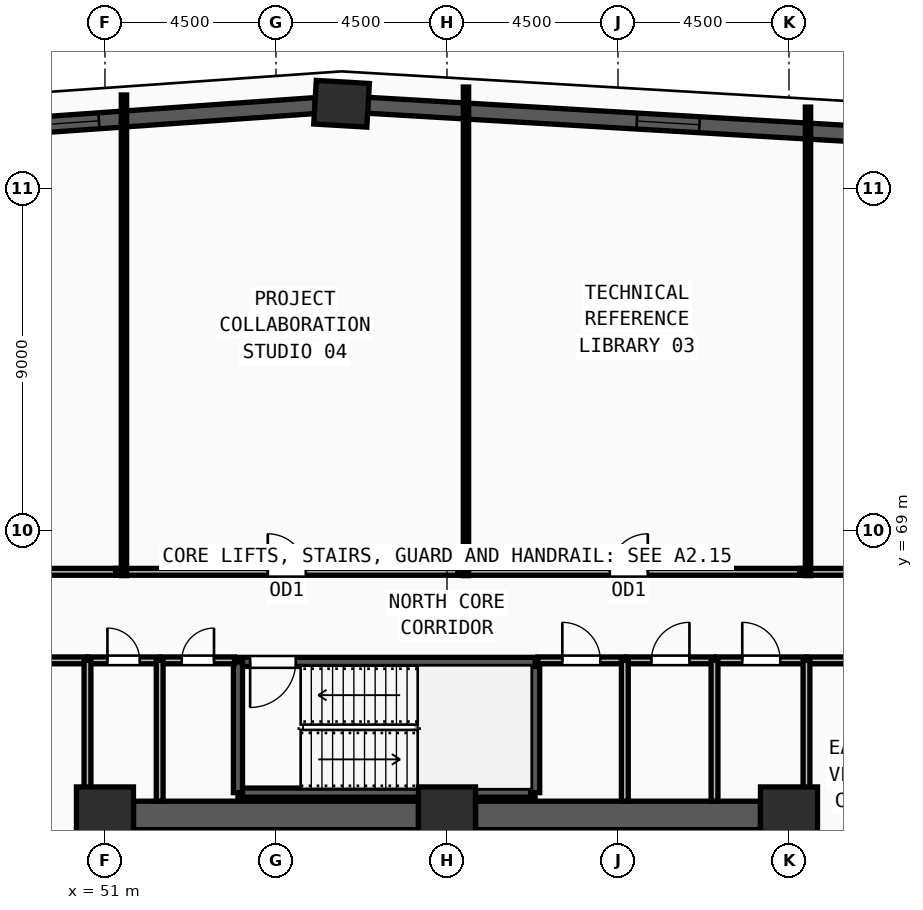
"""IFC4 building model, lengths in metres.
Left out: names, types, materials, properties, quantities, classifications, styles, units other than length and angle.
Written with IfcOpenShell. Run it as: python <this file> out.ifc"""

import sys

from ifc_helpers import new_model, si_unit, direction, frame, frame_2d, origin, origin_2d, place, context, subcontext, project, spatial, rectangle, extrude, source, transform, mapped, element, fill, save


model = new_model("IFC4")
c1 = context("Model", 3, precision=1e-05, world=origin(), true_north=direction((0.0, 1.0)))
c2 = subcontext(c1, "Body", "Model", "MODEL_VIEW")
j1 = project(units=[si_unit("LENGTHUNIT", "METRE"), si_unit("PLANEANGLEUNIT", "RADIAN")], contexts=[c1])
p1 = place(None, origin())
s1 = spatial("IfcSite", under=j1, at=p1, CompositionType="ELEMENT")
p2 = place(p1, origin())
s2 = spatial("IfcBuilding", under=s1, at=p2, CompositionType="ELEMENT")
p3 = place(p2, frame((0.0, 0.0, 124.5)))
s3 = spatial("IfcBuildingStorey", under=s2, at=p3, CompositionType="ELEMENT", Elevation=124.5)
m1 = source(origin(), c2, "Body", "SweptSolid", [
    extrude(rectangle(XDim=1.5, YDim=1.5, at=origin_2d()), origin(), (0.0, 0.0, 1.0), 3.75),
])
for number, where, z_axis, x_axis in (
    (1, (69.0, 61.5, 0.0), (0.0, 0.0, 1.0), (1.0, 0.0, 0.0)),
    (2, (60.0, 61.5, 0.0), (0.0, 0.0, 1.0), (1.0, 0.0, 0.0)),
    (3, (51.0, 61.5, 0.0), (0.0, 0.0, 1.0), (1.0, 0.0, 0.0)),
):
    element("IfcColumn", number, at=place(p3, frame(where, z_axis=z_axis, x_axis=x_axis)), inside=s3, PredefinedType="COLUMN", context=c2, shape_type="MappedRepresentation", body=[
        mapped(m1, transform((0.0, 0.0, 0.0), x_axis=(1.0, 0.0, 0.0), y_axis=(0.0, 1.0, 0.0), z_axis=(0.0, 0.0, 1.0), scale=1.0)),
    ])
m2 = source(origin(), c2, "Body", "SweptSolid", [
    extrude(rectangle(XDim=1.4, YDim=1.15, at=origin_2d()), origin(), (0.0, 0.0, 1.0), 3.75),
])
p4 = place(p3, frame((57.226, 80.226, 0.0), z_axis=(0.0, 0.0, 1.0), x_axis=(-0.99829120239, 0.058435222518, 0.0)))
e4 = element("IfcColumn", 4, at=p4, inside=s3, PredefinedType="COLUMN", context=c2, shape_type="MappedRepresentation", body=[
    mapped(m2, transform((0.0, 0.0, 0.0), x_axis=(1.0, 0.0, 0.0), y_axis=(0.0, 1.0, 0.0), z_axis=(0.0, 0.0, 1.0), scale=1.0)),
])
p5 = place(p3, frame((89.539, 78.332, 0.0), z_axis=(0.0, 0.0, 1.0), x_axis=(-0.998285887644, 0.058525947494, 0.0)))
e5 = element("IfcWall", 5, at=p5, inside=s3, PredefinedType="SOLIDWALL", context=c2, shape_type="SweptSolid", body=[
    extrude(rectangle(XDim=31.678, YDim=0.42, at=frame_2d((15.839, 0.0))), origin(), (0.0, 0.0, 1.0), 3.57),
])
m3 = source(origin(), c2, "Body", "SweptSolid", [
    extrude(rectangle(XDim=1.65, YDim=1.95, at=frame_2d((0.825, 0.975))), frame((0.0, 0.22, 0.0), z_axis=(0.0, -1.0, 0.0), x_axis=(1.0, 0.0, 0.0)), (0.0, 0.0, 1.0), 0.44),
])
p6 = place(p5, frame((7.095, 0.0, 0.55)))
e6 = element("IfcOpeningElement", 6, at=p6, cuts=e5, PredefinedType="OPENING", context=c2, shape_type="MappedRepresentation", body=[
    mapped(m3, transform((0.0, 0.0, 0.0), x_axis=(1.0, 0.0, 0.0), y_axis=(0.0, 1.0, 0.0), z_axis=(0.0, 0.0, 1.0), scale=1.0)),
])
p7 = place(p5, frame((15.014, 0.0, 0.55)))
e7 = element("IfcOpeningElement", 7, at=p7, cuts=e5, PredefinedType="OPENING", context=c2, shape_type="MappedRepresentation", body=[
    mapped(m3, transform((0.0, 0.0, 0.0), x_axis=(1.0, 0.0, 0.0), y_axis=(0.0, 1.0, 0.0), z_axis=(0.0, 0.0, 1.0), scale=1.0)),
])
p8 = place(p5, frame((22.934, 0.0, 0.55)))
e8 = element("IfcOpeningElement", 8, at=p8, cuts=e5, PredefinedType="OPENING", context=c2, shape_type="MappedRepresentation", body=[
    mapped(m3, transform((0.0, 0.0, 0.0), x_axis=(1.0, 0.0, 0.0), y_axis=(0.0, 1.0, 0.0), z_axis=(0.0, 0.0, 1.0), scale=1.0)),
])
p9 = place(p3, frame((56.538, 80.178, 0.0), z_axis=(0.0, 0.0, 1.0), x_axis=(-0.997543510354, -0.070049589226, 0.0)))
e9 = element("IfcWall", 9, at=p9, inside=s3, PredefinedType="SOLIDWALL", context=c2, shape_type="SweptSolid", body=[
    extrude(rectangle(XDim=26.139, YDim=0.42, at=frame_2d((13.07, 0.0))), origin(), (0.0, 0.0, 1.0), 3.57),
])
p10 = place(p9, frame((5.71, 0.0, 0.55)))
e10 = element("IfcOpeningElement", 10, at=p10, cuts=e9, PredefinedType="OPENING", context=c2, shape_type="MappedRepresentation", body=[
    mapped(m3, transform((0.0, 0.0, 0.0), x_axis=(1.0, 0.0, 0.0), y_axis=(0.0, 1.0, 0.0), z_axis=(0.0, 0.0, 1.0), scale=1.0)),
])
p11 = place(p9, frame((12.245, 0.0, 0.55)))
e11 = element("IfcOpeningElement", 11, at=p11, cuts=e9, PredefinedType="OPENING", context=c2, shape_type="MappedRepresentation", body=[
    mapped(m3, transform((0.0, 0.0, 0.0), x_axis=(1.0, 0.0, 0.0), y_axis=(0.0, 1.0, 0.0), z_axis=(0.0, 0.0, 1.0), scale=1.0)),
])
p12 = place(p9, frame((18.779, 0.0, 0.55)))
e12 = element("IfcOpeningElement", 12, at=p12, cuts=e9, PredefinedType="OPENING", context=c2, shape_type="MappedRepresentation", body=[
    mapped(m3, transform((0.0, 0.0, 0.0), x_axis=(1.0, 0.0, 0.0), y_axis=(0.0, 1.0, 0.0), z_axis=(0.0, 0.0, 1.0), scale=1.0)),
])
for number, where, z_axis, x_axis in (
    (13, (51.75, 61.5, 0.0), (0.0, 0.0, 1.0), (1.0, 0.0, 0.0)),
    (14, (60.75, 61.5, 0.0), (0.0, 0.0, 1.0), (1.0, 0.0, 0.0)),
):
    element("IfcWall", number, at=place(p3, frame(where, z_axis=z_axis, x_axis=x_axis)), inside=s3, PredefinedType="SHEAR", context=c2, shape_type="SweptSolid", body=[
        extrude(rectangle(XDim=7.5, YDim=0.75, at=frame_2d((3.75, 0.0))), origin(), (0.0, 0.0, 1.0), 3.57),
    ])
p13 = place(p3, frame((54.5, 62.1, 0.0), z_axis=(0.0, 0.0, 1.0), x_axis=(1.0, 0.0, 0.0)))
e15 = element("IfcWall", 15, at=p13, inside=s3, PredefinedType="SOLIDWALL", context=c2, shape_type="SweptSolid", body=[
    extrude(rectangle(XDim=7.82, YDim=0.24, at=frame_2d((3.91, 0.0))), origin(), (0.0, 0.0, 1.0), 3.57),
])
p14 = place(p3, frame((62.32, 62.1, 0.0), z_axis=(0.0, 0.0, 1.0), x_axis=(0.0, 1.0, 0.0)))
e16 = element("IfcWall", 16, at=p14, inside=s3, PredefinedType="SOLIDWALL", context=c2, shape_type="SweptSolid", body=[
    extrude(rectangle(XDim=3.44, YDim=0.24, at=frame_2d((1.72, 0.0))), origin(), (0.0, 0.0, 1.0), 3.57),
])
p15 = place(p3, frame((62.32, 65.54, 0.0), z_axis=(0.0, 0.0, 1.0), x_axis=(-1.0, 0.0, 0.0)))
e17 = element("IfcWall", 17, at=p15, inside=s3, PredefinedType="SOLIDWALL", context=c2, shape_type="SweptSolid", body=[
    extrude(rectangle(XDim=7.82, YDim=0.24, at=frame_2d((3.91, 0.0))), origin(), (0.0, 0.0, 1.0), 3.57),
])
m4 = source(origin(), c2, "Body", "SweptSolid", [
    extrude(rectangle(XDim=1.2, YDim=2.2, at=frame_2d((0.6, 1.1))), frame((0.0, 0.13, 0.0), z_axis=(0.0, -1.0, 0.0), x_axis=(1.0, 0.0, 0.0)), (0.0, 0.0, 1.0), 0.26),
])
p16 = place(p15, frame((6.3, 0.0, 0.0)))
e18 = element("IfcOpeningElement", 18, at=p16, cuts=e17, PredefinedType="OPENING", context=c2, shape_type="MappedRepresentation", body=[
    mapped(m4, transform((0.0, 0.0, 0.0), x_axis=(1.0, 0.0, 0.0), y_axis=(0.0, 1.0, 0.0), z_axis=(0.0, 0.0, 1.0), scale=1.0)),
])
p17 = place(p3, frame((54.5, 65.54, 0.0), z_axis=(0.0, 0.0, 1.0), x_axis=(0.0, -1.0, 0.0)))
e19 = element("IfcWall", 19, at=p17, inside=s3, PredefinedType="SOLIDWALL", context=c2, shape_type="SweptSolid", body=[
    extrude(rectangle(XDim=3.44, YDim=0.24, at=frame_2d((1.72, 0.0))), origin(), (0.0, 0.0, 1.0), 3.57),
])
p18 = place(p3, frame((50.54, 65.58, 0.0), z_axis=(0.0, 0.0, 1.0), x_axis=(1.0, 0.0, 0.0)))
e20 = element("IfcWall", 20, at=p18, inside=s3, PredefinedType="PARTITIONING", context=c2, shape_type="SweptSolid", body=[
    extrude(rectangle(XDim=1.9, YDim=0.18, at=frame_2d((0.95, 0.0))), origin(), (0.0, 0.0, 1.0), 3.57),
])
m5 = source(origin(), c2, "Body", "SweptSolid", [
    extrude(rectangle(XDim=0.85, YDim=2.1, at=frame_2d((0.425, 1.05))), frame((0.0, 0.1, 0.0), z_axis=(0.0, -1.0, 0.0), x_axis=(1.0, 0.0, 0.0)), (0.0, 0.0, 1.0), 0.2),
])
p19 = place(p18, frame((0.525, 0.0, 0.0)))
e21 = element("IfcOpeningElement", 21, at=p19, cuts=e20, PredefinedType="OPENING", context=c2, shape_type="MappedRepresentation", body=[
    mapped(m5, transform((0.0, 0.0, 0.0), x_axis=(1.0, 0.0, 0.0), y_axis=(0.0, 1.0, 0.0), z_axis=(0.0, 0.0, 1.0), scale=1.0)),
])
p20 = place(p3, frame((52.48, 65.58, 0.0), z_axis=(0.0, 0.0, 1.0), x_axis=(1.0, 0.0, 0.0)))
e22 = element("IfcWall", 22, at=p20, inside=s3, PredefinedType="PARTITIONING", context=c2, shape_type="SweptSolid", body=[
    extrude(rectangle(XDim=1.93, YDim=0.18, at=frame_2d((0.965, 0.0))), origin(), (0.0, 0.0, 1.0), 3.57),
])
p21 = place(p20, frame((0.54, 0.0, 0.0)))
e23 = element("IfcOpeningElement", 23, at=p21, cuts=e22, PredefinedType="OPENING", context=c2, shape_type="MappedRepresentation", body=[
    mapped(m5, transform((0.0, 0.0, 0.0), x_axis=(1.0, 0.0, 0.0), y_axis=(0.0, 1.0, 0.0), z_axis=(0.0, 0.0, 1.0), scale=1.0)),
])
p22 = place(p3, frame((62.39, 65.58, 0.0), z_axis=(0.0, 0.0, 1.0), x_axis=(1.0, 0.0, 0.0)))
e24 = element("IfcWall", 24, at=p22, inside=s3, PredefinedType="PARTITIONING", context=c2, shape_type="SweptSolid", body=[
    extrude(rectangle(XDim=2.29, YDim=0.18, at=frame_2d((1.145, 0.0))), origin(), (0.0, 0.0, 1.0), 3.57),
])
m6 = source(origin(), c2, "Body", "SweptSolid", [
    extrude(rectangle(XDim=1.0, YDim=2.2, at=frame_2d((0.5, 1.1))), frame((0.0, 0.1, 0.0), z_axis=(0.0, -1.0, 0.0), x_axis=(1.0, 0.0, 0.0)), (0.0, 0.0, 1.0), 0.2),
])
p23 = place(p22, frame((0.645, 0.0, 0.0)))
e25 = element("IfcOpeningElement", 25, at=p23, cuts=e24, PredefinedType="OPENING", context=c2, shape_type="MappedRepresentation", body=[
    mapped(m6, transform((0.0, 0.0, 0.0), x_axis=(1.0, 0.0, 0.0), y_axis=(0.0, 1.0, 0.0), z_axis=(0.0, 0.0, 1.0), scale=1.0)),
])
p24 = place(p3, frame((64.72, 65.58, 0.0), z_axis=(0.0, 0.0, 1.0), x_axis=(1.0, 0.0, 0.0)))
e26 = element("IfcWall", 26, at=p24, inside=s3, PredefinedType="PARTITIONING", context=c2, shape_type="SweptSolid", body=[
    extrude(rectangle(XDim=2.32, YDim=0.18, at=frame_2d((1.16, 0.0))), origin(), (0.0, 0.0, 1.0), 3.57),
])
p25 = place(p24, frame((0.66, 0.0, 0.0)))
e27 = element("IfcOpeningElement", 27, at=p25, cuts=e26, PredefinedType="OPENING", context=c2, shape_type="MappedRepresentation", body=[
    mapped(m6, transform((0.0, 0.0, 0.0), x_axis=(1.0, 0.0, 0.0), y_axis=(0.0, 1.0, 0.0), z_axis=(0.0, 0.0, 1.0), scale=1.0)),
])
p26 = place(p3, frame((67.08, 65.58, 0.0), z_axis=(0.0, 0.0, 1.0), x_axis=(1.0, 0.0, 0.0)))
e28 = element("IfcWall", 28, at=p26, inside=s3, PredefinedType="PARTITIONING", context=c2, shape_type="SweptSolid", body=[
    extrude(rectangle(XDim=2.38, YDim=0.18, at=frame_2d((1.19, 0.0))), origin(), (0.0, 0.0, 1.0), 3.57),
])
p27 = place(p26, frame((0.69, 0.0, 0.0)))
e29 = element("IfcOpeningElement", 29, at=p27, cuts=e28, PredefinedType="OPENING", context=c2, shape_type="MappedRepresentation", body=[
    mapped(m6, transform((0.0, 0.0, 0.0), x_axis=(1.0, 0.0, 0.0), y_axis=(0.0, 1.0, 0.0), z_axis=(0.0, 0.0, 1.0), scale=1.0)),
])
p28 = place(p3, frame((46.7, 65.58, 0.0), z_axis=(0.0, 0.0, 1.0), x_axis=(1.0, 0.0, 0.0)))
e30 = element("IfcWall", 30, at=p28, inside=s3, PredefinedType="PARTITIONING", context=c2, shape_type="SweptSolid", body=[
    extrude(rectangle(XDim=3.84, YDim=0.18, at=frame_2d((1.92, 0.0))), origin(), (0.0, 0.0, 1.0), 3.57),
])
m7 = source(origin(), c2, "Body", "SweptSolid", [
    extrude(rectangle(XDim=1.3, YDim=2.2, at=frame_2d((0.65, 1.1))), frame((0.0, 0.1, 0.0), z_axis=(0.0, -1.0, 0.0), x_axis=(1.0, 0.0, 0.0)), (0.0, 0.0, 1.0), 0.2),
])
p29 = place(p28, frame((1.27, 0.0, 0.0)))
e31 = element("IfcOpeningElement", 31, at=p29, cuts=e30, PredefinedType="OPENING", context=c2, shape_type="MappedRepresentation", body=[
    mapped(m7, transform((0.0, 0.0, 0.0), x_axis=(1.0, 0.0, 0.0), y_axis=(0.0, 1.0, 0.0), z_axis=(0.0, 0.0, 1.0), scale=1.0)),
])
p30 = place(p3, frame((69.46, 65.58, 0.0), z_axis=(0.0, 0.0, 1.0), x_axis=(1.0, 0.0, 0.0)))
e32 = element("IfcWall", 32, at=p30, inside=s3, PredefinedType="PARTITIONING", context=c2, shape_type="SweptSolid", body=[
    extrude(rectangle(XDim=3.84, YDim=0.18, at=frame_2d((1.92, 0.0))), origin(), (0.0, 0.0, 1.0), 3.57),
])
p31 = place(p30, frame((1.27, 0.0, 0.0)))
e33 = element("IfcOpeningElement", 33, at=p31, cuts=e32, PredefinedType="OPENING", context=c2, shape_type="MappedRepresentation", body=[
    mapped(m7, transform((0.0, 0.0, 0.0), x_axis=(1.0, 0.0, 0.0), y_axis=(0.0, 1.0, 0.0), z_axis=(0.0, 0.0, 1.0), scale=1.0)),
])
p32 = place(p3, frame((69.285, 67.91, 0.0), z_axis=(0.0, 0.0, 1.0), x_axis=(1.0, 0.0, 0.0)))
e34 = element("IfcWall", 34, at=p32, inside=s3, PredefinedType="PARTITIONING", context=c2, shape_type="SweptSolid", body=[
    extrude(rectangle(XDim=6.345, YDim=0.18, at=frame_2d((3.172, 0.0))), origin(), (0.0, 0.0, 1.0), 3.57),
])
m8 = source(origin(), c2, "Body", "SweptSolid", [
    extrude(rectangle(XDim=1.5, YDim=2.2, at=frame_2d((0.75, 1.1))), frame((0.0, 0.1, 0.0), z_axis=(0.0, -1.0, 0.0), x_axis=(1.0, 0.0, 0.0)), (0.0, 0.0, 1.0), 0.2),
])
p33 = place(p32, frame((2.422, 0.0, 0.0)))
e35 = element("IfcOpeningElement", 35, at=p33, cuts=e34, PredefinedType="OPENING", context=c2, shape_type="MappedRepresentation", body=[
    mapped(m8, transform((0.0, 0.0, 0.0), x_axis=(1.0, 0.0, 0.0), y_axis=(0.0, 1.0, 0.0), z_axis=(0.0, 0.0, 1.0), scale=1.0)),
])
p34 = place(p3, frame((60.285, 67.91, 0.0), z_axis=(0.0, 0.0, 1.0), x_axis=(1.0, 0.0, 0.0)))
e36 = element("IfcWall", 36, at=p34, inside=s3, PredefinedType="PARTITIONING", context=c2, shape_type="SweptSolid", body=[
    extrude(rectangle(XDim=9.0, YDim=0.18, at=frame_2d((4.5, 0.0))), origin(), (0.0, 0.0, 1.0), 3.57),
])
p35 = place(p34, frame((4.0, 0.0, 0.0)))
e37 = element("IfcOpeningElement", 37, at=p35, cuts=e36, PredefinedType="OPENING", context=c2, shape_type="MappedRepresentation", body=[
    mapped(m6, transform((0.0, 0.0, 0.0), x_axis=(1.0, 0.0, 0.0), y_axis=(0.0, 1.0, 0.0), z_axis=(0.0, 0.0, 1.0), scale=1.0)),
])
p36 = place(p3, frame((51.285, 67.91, 0.0), z_axis=(0.0, 0.0, 1.0), x_axis=(1.0, 0.0, 0.0)))
e38 = element("IfcWall", 38, at=p36, inside=s3, PredefinedType="PARTITIONING", context=c2, shape_type="SweptSolid", body=[
    extrude(rectangle(XDim=9.0, YDim=0.18, at=frame_2d((4.5, 0.0))), origin(), (0.0, 0.0, 1.0), 3.57),
])
p37 = place(p36, frame((4.0, 0.0, 0.0)))
e39 = element("IfcOpeningElement", 39, at=p37, cuts=e38, PredefinedType="OPENING", context=c2, shape_type="MappedRepresentation", body=[
    mapped(m6, transform((0.0, 0.0, 0.0), x_axis=(1.0, 0.0, 0.0), y_axis=(0.0, 1.0, 0.0), z_axis=(0.0, 0.0, 1.0), scale=1.0)),
])
p38 = place(p3, frame((44.37, 67.91, 0.0), z_axis=(0.0, 0.0, 1.0), x_axis=(1.0, 0.0, 0.0)))
e40 = element("IfcWall", 40, at=p38, inside=s3, PredefinedType="PARTITIONING", context=c2, shape_type="SweptSolid", body=[
    extrude(rectangle(XDim=6.915, YDim=0.18, at=frame_2d((3.458, 0.0))), origin(), (0.0, 0.0, 1.0), 3.57),
])
p39 = place(p38, frame((2.707, 0.0, 0.0)))
e41 = element("IfcOpeningElement", 41, at=p39, cuts=e40, PredefinedType="OPENING", context=c2, shape_type="MappedRepresentation", body=[
    mapped(m8, transform((0.0, 0.0, 0.0), x_axis=(1.0, 0.0, 0.0), y_axis=(0.0, 1.0, 0.0), z_axis=(0.0, 0.0, 1.0), scale=1.0)),
])
p40 = place(p3, frame((50.54, 61.95, 0.0), z_axis=(0.0, 0.0, 1.0), x_axis=(0.0, 1.0, 0.0)))
e42 = element("IfcWall", 42, at=p40, inside=s3, PredefinedType="PARTITIONING", context=c2, shape_type="SweptSolid", body=[
    extrude(rectangle(XDim=3.63, YDim=0.18, at=frame_2d((1.815, 0.0))), origin(), (0.0, 0.0, 1.0), 3.57),
])
for number, where, z_axis, x_axis in (
    (43, (52.44, 61.875, 0.0), (0.0, 0.0, 1.0), (0.0, 1.0, 0.0)),
    (44, (64.68, 61.875, 0.0), (0.0, 0.0, 1.0), (0.0, 1.0, 0.0)),
    (45, (67.04, 61.875, 0.0), (0.0, 0.0, 1.0), (0.0, 1.0, 0.0)),
):
    element("IfcWall", number, at=place(p3, frame(where, z_axis=z_axis, x_axis=x_axis)), inside=s3, PredefinedType="PARTITIONING", context=c2, shape_type="SweptSolid", body=[
        extrude(rectangle(XDim=3.705, YDim=0.18, at=frame_2d((1.853, 0.0))), origin(), (0.0, 0.0, 1.0), 3.57),
    ])
p41 = place(p3, frame((69.46, 61.95, 0.0), z_axis=(0.0, 0.0, 1.0), x_axis=(0.0, 1.0, 0.0)))
e46 = element("IfcWall", 46, at=p41, inside=s3, PredefinedType="PARTITIONING", context=c2, shape_type="SweptSolid", body=[
    extrude(rectangle(XDim=3.63, YDim=0.18, at=frame_2d((1.815, 0.0))), origin(), (0.0, 0.0, 1.0), 3.57),
])
p42 = place(p3, frame((51.5, 67.81, 0.0), z_axis=(0.0, 0.0, 1.0), x_axis=(0.0, 1.0, 0.0)))
e47 = element("IfcWall", 47, at=p42, inside=s3, PredefinedType="PARTITIONING", context=c2, shape_type="SweptSolid", body=[
    extrude(rectangle(XDim=12.646, YDim=0.14, at=frame_2d((6.323, 0.0))), origin(), (0.0, 0.0, 1.0), 3.57),
])
p43 = place(p3, frame((60.5, 67.81, 0.0), z_axis=(0.0, 0.0, 1.0), x_axis=(0.0, 1.0, 0.0)))
e48 = element("IfcWall", 48, at=p43, inside=s3, PredefinedType="PARTITIONING", context=c2, shape_type="SweptSolid", body=[
    extrude(rectangle(XDim=12.855, YDim=0.14, at=frame_2d((6.427, 0.0))), origin(), (0.0, 0.0, 1.0), 3.57),
])
p44 = place(p3, frame((69.5, 67.81, 0.0), z_axis=(0.0, 0.0, 1.0), x_axis=(0.0, 1.0, 0.0)))
e49 = element("IfcWall", 49, at=p44, inside=s3, PredefinedType="PARTITIONING", context=c2, shape_type="SweptSolid", body=[
    extrude(rectangle(XDim=12.328, YDim=0.14, at=frame_2d((6.164, 0.0))), origin(), (0.0, 0.0, 1.0), 3.57),
])
m9 = source(origin(), c2, "Body", "SweptSolid", [
    extrude(rectangle(XDim=1.65, YDim=1.95, at=frame_2d((0.825, 0.975))), frame((0.0, 0.03, 0.0), z_axis=(0.0, -1.0, 0.0), x_axis=(1.0, 0.0, 0.0)), (0.0, 0.0, 1.0), 0.06),
])
p45 = place(p8, origin())
e50 = element("IfcWindow", 50, at=p45, inside=s3, PartitioningType="DOUBLE_PANEL_VERTICAL", PredefinedType="WINDOW", context=c2, shape_type="MappedRepresentation", body=[
    mapped(m9, transform((0.0, 0.0, 0.0), x_axis=(1.0, 0.0, 0.0), y_axis=(0.0, 1.0, 0.0), z_axis=(0.0, 0.0, 1.0), scale=1.0)),
])
fill(e8, e50)
p46 = place(p10, origin())
e51 = element("IfcWindow", 51, at=p46, inside=s3, PartitioningType="DOUBLE_PANEL_VERTICAL", PredefinedType="WINDOW", context=c2, shape_type="MappedRepresentation", body=[
    mapped(m9, transform((0.0, 0.0, 0.0), x_axis=(1.0, 0.0, 0.0), y_axis=(0.0, 1.0, 0.0), z_axis=(0.0, 0.0, 1.0), scale=1.0)),
])
fill(e10, e51)
m10 = source(origin(), c2, "Body", "SweptSolid", [
    extrude(rectangle(XDim=1.2, YDim=2.2, at=frame_2d((0.6, 1.1))), frame((0.0, 0.025, 0.0), z_axis=(0.0, -1.0, 0.0), x_axis=(1.0, 0.0, 0.0)), (0.0, 0.0, 1.0), 0.05),
])
p47 = place(p16, origin())
e52 = element("IfcDoor", 52, at=p47, inside=s3, OperationType="SINGLE_SWING_RIGHT", PredefinedType="DOOR", context=c2, shape_type="MappedRepresentation", body=[
    mapped(m10, transform((0.0, 0.0, 0.0), x_axis=(1.0, 0.0, 0.0), y_axis=(0.0, 1.0, 0.0), z_axis=(0.0, 0.0, 1.0), scale=1.0)),
])
fill(e18, e52)
m11 = source(origin(), c2, "Body", "SweptSolid", [
    extrude(rectangle(XDim=0.85, YDim=2.1, at=frame_2d((0.425, 1.05))), frame((0.0, 0.025, 0.0), z_axis=(0.0, -1.0, 0.0), x_axis=(1.0, 0.0, 0.0)), (0.0, 0.0, 1.0), 0.05),
])
p48 = place(p19, origin())
e53 = element("IfcDoor", 53, at=p48, inside=s3, OperationType="SINGLE_SWING_LEFT", PredefinedType="DOOR", context=c2, shape_type="MappedRepresentation", body=[
    mapped(m11, transform((0.0, 0.0, 0.0), x_axis=(1.0, 0.0, 0.0), y_axis=(0.0, 1.0, 0.0), z_axis=(0.0, 0.0, 1.0), scale=1.0)),
])
fill(e21, e53)
p49 = place(p21, origin())
e54 = element("IfcDoor", 54, at=p49, inside=s3, OperationType="SINGLE_SWING_RIGHT", PredefinedType="DOOR", context=c2, shape_type="MappedRepresentation", body=[
    mapped(m11, transform((0.0, 0.0, 0.0), x_axis=(1.0, 0.0, 0.0), y_axis=(0.0, 1.0, 0.0), z_axis=(0.0, 0.0, 1.0), scale=1.0)),
])
fill(e23, e54)
m12 = source(origin(), c2, "Body", "SweptSolid", [
    extrude(rectangle(XDim=1.0, YDim=2.2, at=frame_2d((0.5, 1.1))), frame((0.0, 0.025, 0.0), z_axis=(0.0, -1.0, 0.0), x_axis=(1.0, 0.0, 0.0)), (0.0, 0.0, 1.0), 0.05),
])
p50 = place(p23, origin())
e55 = element("IfcDoor", 55, at=p50, inside=s3, OperationType="SINGLE_SWING_LEFT", PredefinedType="DOOR", context=c2, shape_type="MappedRepresentation", body=[
    mapped(m12, transform((0.0, 0.0, 0.0), x_axis=(1.0, 0.0, 0.0), y_axis=(0.0, 1.0, 0.0), z_axis=(0.0, 0.0, 1.0), scale=1.0)),
])
fill(e25, e55)
p51 = place(p25, origin())
e56 = element("IfcDoor", 56, at=p51, inside=s3, OperationType="SINGLE_SWING_RIGHT", PredefinedType="DOOR", context=c2, shape_type="MappedRepresentation", body=[
    mapped(m12, transform((0.0, 0.0, 0.0), x_axis=(1.0, 0.0, 0.0), y_axis=(0.0, 1.0, 0.0), z_axis=(0.0, 0.0, 1.0), scale=1.0)),
])
fill(e27, e56)
p52 = place(p27, origin())
e57 = element("IfcDoor", 57, at=p52, inside=s3, OperationType="SINGLE_SWING_LEFT", PredefinedType="DOOR", context=c2, shape_type="MappedRepresentation", body=[
    mapped(m12, transform((0.0, 0.0, 0.0), x_axis=(1.0, 0.0, 0.0), y_axis=(0.0, 1.0, 0.0), z_axis=(0.0, 0.0, 1.0), scale=1.0)),
])
fill(e29, e57)
p53 = place(p35, origin())
e58 = element("IfcDoor", 58, at=p53, inside=s3, OperationType="SINGLE_SWING_RIGHT", PredefinedType="DOOR", context=c2, shape_type="MappedRepresentation", body=[
    mapped(m12, transform((0.0, 0.0, 0.0), x_axis=(1.0, 0.0, 0.0), y_axis=(0.0, 1.0, 0.0), z_axis=(0.0, 0.0, 1.0), scale=1.0)),
])
fill(e37, e58)
p54 = place(p37, origin())
e59 = element("IfcDoor", 59, at=p54, inside=s3, OperationType="SINGLE_SWING_LEFT", PredefinedType="DOOR", context=c2, shape_type="MappedRepresentation", body=[
    mapped(m12, transform((0.0, 0.0, 0.0), x_axis=(1.0, 0.0, 0.0), y_axis=(0.0, 1.0, 0.0), z_axis=(0.0, 0.0, 1.0), scale=1.0)),
])
fill(e39, e59)
save(model, sys.argv[1])
